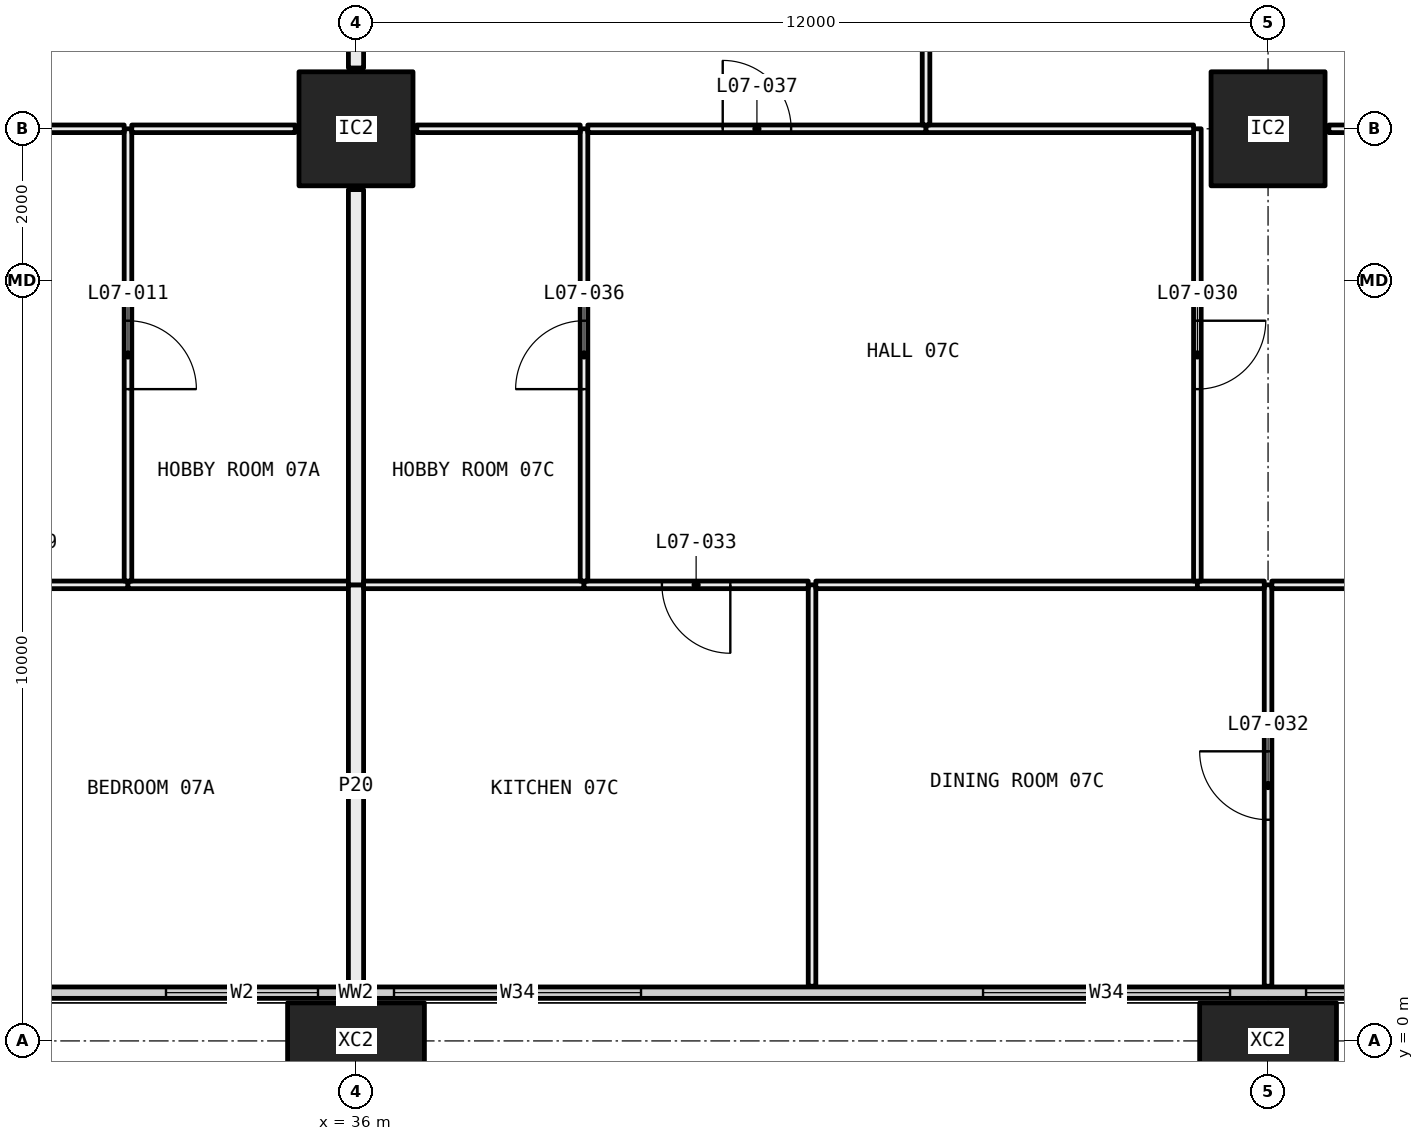
"""IFC4 building model, lengths in metres.
Left out: names, types, materials, properties, quantities, classifications, styles, units other than length and angle.
Written with IfcOpenShell. Run it as: python <this file> out.ifc"""

import sys

from ifc_helpers import new_model, si_unit, direction, frame, frame_2d, origin, origin_2d, place, context, subcontext, project, spatial, rectangle, hollow_rectangle, extrude, element, fill, save


model = new_model("IFC4")
c1 = context("Model", 3, precision=1e-05, world=origin(), true_north=direction((0.0, 1.0)))
c2 = subcontext(c1, "Body", "Model", "MODEL_VIEW")
j1 = project(units=[si_unit("LENGTHUNIT", "METRE"), si_unit("PLANEANGLEUNIT", "RADIAN")], contexts=[c1])
p1 = place(None, origin())
s1 = spatial("IfcSite", under=j1, at=p1, CompositionType="ELEMENT")
p2 = place(p1, origin())
s2 = spatial("IfcBuilding", under=s1, at=p2, CompositionType="ELEMENT")
p3 = place(p2, frame((0.0, 0.0, 36.9)))
s3 = spatial("IfcBuildingStorey", under=s2, at=p3, CompositionType="ELEMENT", Elevation=36.9)
p4 = place(p3, frame((36.0, 0.0, -0.4), z_axis=(0.0, 0.0, 1.0), x_axis=(1.0, 0.0, 0.0)))
e1 = element("IfcColumn", 1, at=p4, inside=s3, PredefinedType="COLUMN", context=c2, shape_type="SweptSolid", body=[
    extrude(hollow_rectangle(XDim=1.8, YDim=1.0, WallThickness=0.07, at=origin_2d()), origin(), (0.0, 0.0, 1.0), 3.45),
])
p5 = place(p3, frame((36.0, 12.0, 0.0), z_axis=(0.0, 0.0, 1.0), x_axis=(1.0, 0.0, 0.0)))
e2 = element("IfcColumn", 2, at=p5, inside=s3, PredefinedType="COLUMN", context=c2, shape_type="SweptSolid", body=[
    extrude(hollow_rectangle(XDim=1.5, YDim=1.5, WallThickness=0.065, at=origin_2d()), origin(), (0.0, 0.0, 1.0), 3.05),
])
p6 = place(p3, frame((48.0, 0.0, -0.4), z_axis=(0.0, 0.0, 1.0), x_axis=(1.0, 0.0, 0.0)))
e3 = element("IfcColumn", 3, at=p6, inside=s3, PredefinedType="COLUMN", context=c2, shape_type="SweptSolid", body=[
    extrude(hollow_rectangle(XDim=1.8, YDim=1.0, WallThickness=0.07, at=origin_2d()), origin(), (0.0, 0.0, 1.0), 3.45),
])
p7 = place(p3, frame((48.0, 12.0, 0.0), z_axis=(0.0, 0.0, 1.0), x_axis=(1.0, 0.0, 0.0)))
e4 = element("IfcColumn", 4, at=p7, inside=s3, PredefinedType="COLUMN", context=c2, shape_type="SweptSolid", body=[
    extrude(hollow_rectangle(XDim=1.5, YDim=1.5, WallThickness=0.065, at=origin_2d()), origin(), (0.0, 0.0, 1.0), 3.05),
])
p8 = place(p3, frame((6.56, 0.635, 0.0), z_axis=(0.0, 0.0, 1.0), x_axis=(1.0, 0.0, 0.0)))
e5 = element("IfcWall", 5, at=p8, inside=s3, PredefinedType="ELEMENTEDWALL", context=c2, shape_type="SweptSolid", body=[
    extrude(rectangle(XDim=58.88, YDim=0.15, at=frame_2d((29.44, 0.0))), origin(), (0.0, 0.0, 1.0), 3.05),
])
p9 = place(p8, frame((0.44, 0.0, 0.45)))
e6 = element("IfcOpeningElement", 6, at=p9, cuts=e5, PredefinedType="OPENING", context=c2, shape_type="SweptSolid", body=[
    extrude(rectangle(XDim=4.5, YDim=2.55, at=frame_2d((2.25, 1.275))), frame((0.0, 0.085, 0.0), z_axis=(0.0, -1.0, 0.0), x_axis=(1.0, 0.0, 0.0)), (0.0, 0.0, 1.0), 0.17),
])
p10 = place(p8, frame((5.94, 0.0, 0.45)))
e7 = element("IfcOpeningElement", 7, at=p10, cuts=e5, PredefinedType="OPENING", context=c2, shape_type="SweptSolid", body=[
    extrude(rectangle(XDim=3.25, YDim=2.55, at=frame_2d((1.625, 1.275))), frame((0.0, 0.085, 0.0), z_axis=(0.0, -1.0, 0.0), x_axis=(1.0, 0.0, 0.0)), (0.0, 0.0, 1.0), 0.17),
])
p11 = place(p8, frame((13.69, 0.0, 0.45)))
e8 = element("IfcOpeningElement", 8, at=p11, cuts=e5, PredefinedType="OPENING", context=c2, shape_type="SweptSolid", body=[
    extrude(rectangle(XDim=3.25, YDim=2.55, at=frame_2d((1.625, 1.275))), frame((0.0, 0.085, 0.0), z_axis=(0.0, -1.0, 0.0), x_axis=(1.0, 0.0, 0.0)), (0.0, 0.0, 1.0), 0.17),
])
p12 = place(p8, frame((17.94, 0.0, 0.45)))
e9 = element("IfcOpeningElement", 9, at=p12, cuts=e5, PredefinedType="OPENING", context=c2, shape_type="SweptSolid", body=[
    extrude(rectangle(XDim=3.25, YDim=2.55, at=frame_2d((1.625, 1.275))), frame((0.0, 0.085, 0.0), z_axis=(0.0, -1.0, 0.0), x_axis=(1.0, 0.0, 0.0)), (0.0, 0.0, 1.0), 0.17),
])
p13 = place(p8, frame((26.94, 0.0, 0.45)))
e10 = element("IfcOpeningElement", 10, at=p13, cuts=e5, PredefinedType="OPENING", context=c2, shape_type="SweptSolid", body=[
    extrude(rectangle(XDim=2.0, YDim=2.55, at=frame_2d((1.0, 1.275))), frame((0.0, 0.085, 0.0), z_axis=(0.0, -1.0, 0.0), x_axis=(1.0, 0.0, 0.0)), (0.0, 0.0, 1.0), 0.17),
])
p14 = place(p8, frame((29.94, 0.0, 0.45)))
e11 = element("IfcOpeningElement", 11, at=p14, cuts=e5, PredefinedType="OPENING", context=c2, shape_type="SweptSolid", body=[
    extrude(rectangle(XDim=3.25, YDim=2.55, at=frame_2d((1.625, 1.275))), frame((0.0, 0.085, 0.0), z_axis=(0.0, -1.0, 0.0), x_axis=(1.0, 0.0, 0.0)), (0.0, 0.0, 1.0), 0.17),
])
p15 = place(p8, frame((37.69, 0.0, 0.45)))
e12 = element("IfcOpeningElement", 12, at=p15, cuts=e5, PredefinedType="OPENING", context=c2, shape_type="SweptSolid", body=[
    extrude(rectangle(XDim=3.25, YDim=2.55, at=frame_2d((1.625, 1.275))), frame((0.0, 0.085, 0.0), z_axis=(0.0, -1.0, 0.0), x_axis=(1.0, 0.0, 0.0)), (0.0, 0.0, 1.0), 0.17),
])
p16 = place(p8, frame((41.94, 0.0, 0.45)))
e13 = element("IfcOpeningElement", 13, at=p16, cuts=e5, PredefinedType="OPENING", context=c2, shape_type="SweptSolid", body=[
    extrude(rectangle(XDim=3.25, YDim=2.55, at=frame_2d((1.625, 1.275))), frame((0.0, 0.085, 0.0), z_axis=(0.0, -1.0, 0.0), x_axis=(1.0, 0.0, 0.0)), (0.0, 0.0, 1.0), 0.17),
])
p17 = place(p8, frame((50.94, 0.0, 0.45)))
e14 = element("IfcOpeningElement", 14, at=p17, cuts=e5, PredefinedType="OPENING", context=c2, shape_type="SweptSolid", body=[
    extrude(rectangle(XDim=2.0, YDim=2.55, at=frame_2d((1.0, 1.275))), frame((0.0, 0.085, 0.0), z_axis=(0.0, -1.0, 0.0), x_axis=(1.0, 0.0, 0.0)), (0.0, 0.0, 1.0), 0.17),
])
p18 = place(p8, frame((53.94, 0.0, 0.45)))
e15 = element("IfcOpeningElement", 15, at=p18, cuts=e5, PredefinedType="OPENING", context=c2, shape_type="SweptSolid", body=[
    extrude(rectangle(XDim=4.5, YDim=2.55, at=frame_2d((2.25, 1.275))), frame((0.0, 0.085, 0.0), z_axis=(0.0, -1.0, 0.0), x_axis=(1.0, 0.0, 0.0)), (0.0, 0.0, 1.0), 0.17),
])
p19 = place(p3, frame((33.0, 6.0, 0.0), z_axis=(0.0, 0.0, 1.0), x_axis=(-1.0, 0.0, 0.0)))
e16 = element("IfcWall", 16, at=p19, inside=s3, PredefinedType="PARTITIONING", context=c2, shape_type="SweptSolid", body=[
    extrude(rectangle(XDim=2.95, YDim=0.1, at=frame_2d((1.475, 0.0))), origin(), (0.0, 0.0, 1.0), 3.05),
])
p20 = place(p19, frame((1.025, 0.0, 0.0)))
e17 = element("IfcOpeningElement", 17, at=p20, cuts=e16, PredefinedType="OPENING", context=c2, shape_type="SweptSolid", body=[
    extrude(rectangle(XDim=0.9, YDim=2.1, at=frame_2d((0.45, 1.05))), frame((0.0, 0.06, 0.0), z_axis=(0.0, -1.0, 0.0), x_axis=(1.0, 0.0, 0.0)), (0.0, 0.0, 1.0), 0.12),
])
p21 = place(p3, frame((35.9, 6.0, 0.0), z_axis=(0.0, 0.0, 1.0), x_axis=(-1.0, 0.0, 0.0)))
e18 = element("IfcWall", 18, at=p21, inside=s3, PredefinedType="PARTITIONING", context=c2, shape_type="SweptSolid", body=[
    extrude(rectangle(XDim=2.9, YDim=0.1, at=frame_2d((1.45, 0.0))), origin(), (0.0, 0.0, 1.0), 3.05),
])
p22 = place(p3, frame((36.0, 0.72, 0.0), z_axis=(0.0, 0.0, 1.0), x_axis=(0.0, 1.0, 0.0)))
e19 = element("IfcWall", 19, at=p22, inside=s3, PredefinedType="PARTITIONING", context=c2, shape_type="SweptSolid", body=[
    extrude(rectangle(XDim=5.28, YDim=0.2, at=frame_2d((2.64, 0.0))), origin(), (0.0, 0.0, 1.0), 2.45),
])
p23 = place(p3, frame((33.0, 6.05, 0.0), z_axis=(0.0, 0.0, 1.0), x_axis=(0.0, 1.0, 0.0)))
e20 = element("IfcWall", 20, at=p23, inside=s3, PredefinedType="PARTITIONING", context=c2, shape_type="SweptSolid", body=[
    extrude(rectangle(XDim=5.95, YDim=0.1, at=frame_2d((2.975, 0.0))), origin(), (0.0, 0.0, 1.0), 2.45),
])
p24 = place(p23, frame((2.525, 0.0, 0.0)))
e21 = element("IfcOpeningElement", 21, at=p24, cuts=e20, PredefinedType="OPENING", context=c2, shape_type="SweptSolid", body=[
    extrude(rectangle(XDim=0.9, YDim=2.1, at=frame_2d((0.45, 1.05))), frame((0.0, 0.06, 0.0), z_axis=(0.0, -1.0, 0.0), x_axis=(1.0, 0.0, 0.0)), (0.0, 0.0, 1.0), 0.12),
])
p25 = place(p3, frame((32.95, 12.0, 0.0), z_axis=(0.0, 0.0, 1.0), x_axis=(-1.0, 0.0, 0.0)))
e22 = element("IfcWall", 22, at=p25, inside=s3, PredefinedType="PARTITIONING", context=c2, shape_type="SweptSolid", body=[
    extrude(rectangle(XDim=5.95, YDim=0.1, at=frame_2d((2.975, 0.0))), origin(), (0.0, 0.0, 1.0), 2.45),
])
p26 = place(p25, frame((2.525, 0.0, 0.0)))
e23 = element("IfcOpeningElement", 23, at=p26, cuts=e22, PredefinedType="OPENING", context=c2, shape_type="SweptSolid", body=[
    extrude(rectangle(XDim=0.9, YDim=2.1, at=frame_2d((0.45, 1.05))), frame((0.0, 0.06, 0.0), z_axis=(0.0, -1.0, 0.0), x_axis=(1.0, 0.0, 0.0)), (0.0, 0.0, 1.0), 0.12),
])
p27 = place(p3, frame((35.2, 12.0, 0.0), z_axis=(0.0, 0.0, 1.0), x_axis=(-1.0, 0.0, 0.0)))
e24 = element("IfcWall", 24, at=p27, inside=s3, PredefinedType="PARTITIONING", context=c2, shape_type="SweptSolid", body=[
    extrude(rectangle(XDim=2.15, YDim=0.1, at=frame_2d((1.075, 0.0))), origin(), (0.0, 0.0, 1.0), 2.45),
])
for number, where, z_axis, x_axis in (
    (25, (36.0, 6.0, 0.0), (0.0, 0.0, 1.0), (0.0, 1.0, 0.0)),
    (26, (36.0, 12.8, 0.0), (0.0, 0.0, 1.0), (0.0, 1.0, 0.0)),
):
    element("IfcWall", number, at=place(p3, frame(where, z_axis=z_axis, x_axis=x_axis)), inside=s3, PredefinedType="PARTITIONING", context=c2, shape_type="SweptSolid", body=[
        extrude(rectangle(XDim=5.2, YDim=0.2, at=frame_2d((2.6, 0.0))), origin(), (0.0, 0.0, 1.0), 2.45),
    ])
p28 = place(p3, frame((42.0, 0.72, 0.0), z_axis=(0.0, 0.0, 1.0), x_axis=(0.0, 1.0, 0.0)))
e27 = element("IfcWall", 27, at=p28, inside=s3, PredefinedType="PARTITIONING", context=c2, shape_type="SweptSolid", body=[
    extrude(rectangle(XDim=5.28, YDim=0.1, at=frame_2d((2.64, 0.0))), origin(), (0.0, 0.0, 1.0), 3.05),
])
p29 = place(p3, frame((39.0, 6.0, 0.0), z_axis=(0.0, 0.0, 1.0), x_axis=(-1.0, 0.0, 0.0)))
e28 = element("IfcWall", 28, at=p29, inside=s3, PredefinedType="PARTITIONING", context=c2, shape_type="SweptSolid", body=[
    extrude(rectangle(XDim=2.9, YDim=0.1, at=frame_2d((1.45, 0.0))), origin(), (0.0, 0.0, 1.0), 3.05),
])
p30 = place(p3, frame((41.95, 6.0, 0.0), z_axis=(0.0, 0.0, 1.0), x_axis=(-1.0, 0.0, 0.0)))
e29 = element("IfcWall", 29, at=p30, inside=s3, PredefinedType="PARTITIONING", context=c2, shape_type="SweptSolid", body=[
    extrude(rectangle(XDim=2.95, YDim=0.1, at=frame_2d((1.475, 0.0))), origin(), (0.0, 0.0, 1.0), 3.05),
])
p31 = place(p30, frame((1.025, 0.0, 0.0)))
e30 = element("IfcOpeningElement", 30, at=p31, cuts=e29, PredefinedType="OPENING", context=c2, shape_type="SweptSolid", body=[
    extrude(rectangle(XDim=0.9, YDim=2.1, at=frame_2d((0.45, 1.05))), frame((0.0, 0.06, 0.0), z_axis=(0.0, -1.0, 0.0), x_axis=(1.0, 0.0, 0.0)), (0.0, 0.0, 1.0), 0.12),
])
p32 = place(p3, frame((48.0, 0.72, 0.0), z_axis=(0.0, 0.0, 1.0), x_axis=(0.0, 1.0, 0.0)))
e31 = element("IfcWall", 31, at=p32, inside=s3, PredefinedType="PARTITIONING", context=c2, shape_type="SweptSolid", body=[
    extrude(rectangle(XDim=5.28, YDim=0.1, at=frame_2d((2.64, 0.0))), origin(), (0.0, 0.0, 1.0), 2.45),
])
p33 = place(p32, frame((2.19, 0.0, 0.0)))
e32 = element("IfcOpeningElement", 32, at=p33, cuts=e31, PredefinedType="OPENING", context=c2, shape_type="SweptSolid", body=[
    extrude(rectangle(XDim=0.9, YDim=2.1, at=frame_2d((0.45, 1.05))), frame((0.0, 0.06, 0.0), z_axis=(0.0, -1.0, 0.0), x_axis=(1.0, 0.0, 0.0)), (0.0, 0.0, 1.0), 0.12),
])
p34 = place(p3, frame((47.07, 6.0, 0.0), z_axis=(0.0, 0.0, 1.0), x_axis=(-1.0, 0.0, 0.0)))
e33 = element("IfcWall", 33, at=p34, inside=s3, PredefinedType="PARTITIONING", context=c2, shape_type="SweptSolid", body=[
    extrude(rectangle(XDim=5.02, YDim=0.1, at=frame_2d((2.51, 0.0))), origin(), (0.0, 0.0, 1.0), 3.05),
])
p35 = place(p3, frame((47.95, 6.0, 0.0), z_axis=(0.0, 0.0, 1.0), x_axis=(-1.0, 0.0, 0.0)))
e34 = element("IfcWall", 34, at=p35, inside=s3, PredefinedType="PARTITIONING", context=c2, shape_type="SweptSolid", body=[
    extrude(rectangle(XDim=0.88, YDim=0.1, at=frame_2d((0.44, 0.0))), origin(), (0.0, 0.0, 1.0), 2.45),
])
p36 = place(p3, frame((55.14, 6.0, 0.0), z_axis=(0.0, 0.0, 1.0), x_axis=(-1.0, 0.0, 0.0)))
e35 = element("IfcWall", 35, at=p36, inside=s3, PredefinedType="PARTITIONING", context=c2, shape_type="SweptSolid", body=[
    extrude(rectangle(XDim=7.09, YDim=0.1, at=frame_2d((3.545, 0.0))), origin(), (0.0, 0.0, 1.0), 2.45),
])
p37 = place(p36, frame((3.095, 0.0, 0.0)))
e36 = element("IfcOpeningElement", 36, at=p37, cuts=e35, PredefinedType="OPENING", context=c2, shape_type="SweptSolid", body=[
    extrude(rectangle(XDim=0.9, YDim=2.1, at=frame_2d((0.45, 1.05))), frame((0.0, 0.06, 0.0), z_axis=(0.0, -1.0, 0.0), x_axis=(1.0, 0.0, 0.0)), (0.0, 0.0, 1.0), 0.12),
])
p38 = place(p3, frame((39.0, 6.05, 0.0), z_axis=(0.0, 0.0, 1.0), x_axis=(0.0, 1.0, 0.0)))
e37 = element("IfcWall", 37, at=p38, inside=s3, PredefinedType="PARTITIONING", context=c2, shape_type="SweptSolid", body=[
    extrude(rectangle(XDim=5.95, YDim=0.1, at=frame_2d((2.975, 0.0))), origin(), (0.0, 0.0, 1.0), 2.45),
])
p39 = place(p38, frame((2.525, 0.0, 0.0)))
e38 = element("IfcOpeningElement", 38, at=p39, cuts=e37, PredefinedType="OPENING", context=c2, shape_type="SweptSolid", body=[
    extrude(rectangle(XDim=0.9, YDim=2.1, at=frame_2d((0.45, 1.05))), frame((0.0, 0.06, 0.0), z_axis=(0.0, -1.0, 0.0), x_axis=(1.0, 0.0, 0.0)), (0.0, 0.0, 1.0), 0.12),
])
p40 = place(p3, frame((38.95, 12.0, 0.0), z_axis=(0.0, 0.0, 1.0), x_axis=(-1.0, 0.0, 0.0)))
e39 = element("IfcWall", 39, at=p40, inside=s3, PredefinedType="PARTITIONING", context=c2, shape_type="SweptSolid", body=[
    extrude(rectangle(XDim=2.15, YDim=0.1, at=frame_2d((1.075, 0.0))), origin(), (0.0, 0.0, 1.0), 2.45),
])
p41 = place(p3, frame((47.07, 6.05, 0.0), z_axis=(0.0, 0.0, 1.0), x_axis=(0.0, 1.0, 0.0)))
e40 = element("IfcWall", 40, at=p41, inside=s3, PredefinedType="PARTITIONING", context=c2, shape_type="SweptSolid", body=[
    extrude(rectangle(XDim=5.95, YDim=0.1, at=frame_2d((2.975, 0.0))), origin(), (0.0, 0.0, 1.0), 2.45),
])
p42 = place(p41, frame((2.525, 0.0, 0.0)))
e41 = element("IfcOpeningElement", 41, at=p42, cuts=e40, PredefinedType="OPENING", context=c2, shape_type="SweptSolid", body=[
    extrude(rectangle(XDim=0.9, YDim=2.1, at=frame_2d((0.45, 1.05))), frame((0.0, 0.06, 0.0), z_axis=(0.0, -1.0, 0.0), x_axis=(1.0, 0.0, 0.0)), (0.0, 0.0, 1.0), 0.12),
])
p43 = place(p3, frame((43.5, 12.0, 0.0), z_axis=(0.0, 0.0, 1.0), x_axis=(-1.0, 0.0, 0.0)))
e42 = element("IfcWall", 42, at=p43, inside=s3, PredefinedType="PARTITIONING", context=c2, shape_type="SweptSolid", body=[
    extrude(rectangle(XDim=4.45, YDim=0.1, at=frame_2d((2.225, 0.0))), origin(), (0.0, 0.0, 1.0), 2.45),
])
p44 = place(p43, frame((1.775, 0.0, 0.0)))
e43 = element("IfcOpeningElement", 43, at=p44, cuts=e42, PredefinedType="OPENING", context=c2, shape_type="SweptSolid", body=[
    extrude(rectangle(XDim=0.9, YDim=2.1, at=frame_2d((0.45, 1.05))), frame((0.0, 0.06, 0.0), z_axis=(0.0, -1.0, 0.0), x_axis=(1.0, 0.0, 0.0)), (0.0, 0.0, 1.0), 0.12),
])
p45 = place(p3, frame((47.02, 12.0, 0.0), z_axis=(0.0, 0.0, 1.0), x_axis=(-1.0, 0.0, 0.0)))
e44 = element("IfcWall", 44, at=p45, inside=s3, PredefinedType="PARTITIONING", context=c2, shape_type="SweptSolid", body=[
    extrude(rectangle(XDim=3.52, YDim=0.1, at=frame_2d((1.76, 0.0))), origin(), (0.0, 0.0, 1.0), 2.45),
])
p46 = place(p3, frame((51.0, 12.0, 0.0), z_axis=(0.0, 0.0, 1.0), x_axis=(-1.0, 0.0, 0.0)))
e45 = element("IfcWall", 45, at=p46, inside=s3, PredefinedType="PARTITIONING", context=c2, shape_type="SweptSolid", body=[
    extrude(rectangle(XDim=2.2, YDim=0.1, at=frame_2d((1.1, 0.0))), origin(), (0.0, 0.0, 1.0), 2.45),
])
p47 = place(p3, frame((43.5, 12.05, 0.0), z_axis=(0.0, 0.0, 1.0), x_axis=(0.0, 1.0, 0.0)))
e46 = element("IfcWall", 46, at=p47, inside=s3, PredefinedType="PARTITIONING", context=c2, shape_type="SweptSolid", body=[
    extrude(rectangle(XDim=5.95, YDim=0.1, at=frame_2d((2.975, 0.0))), origin(), (0.0, 0.0, 1.0), 2.45),
])
p48 = place(p13, origin())
e47 = element("IfcWindow", 47, at=p48, inside=s3, PartitioningType="SINGLE_PANEL", PredefinedType="WINDOW", context=c2, shape_type="SweptSolid", body=[
    extrude(rectangle(XDim=2.0, YDim=2.55, at=frame_2d((1.0, 1.275))), frame((0.0, 0.03, 0.0), z_axis=(0.0, -1.0, 0.0), x_axis=(1.0, 0.0, 0.0)), (0.0, 0.0, 1.0), 0.06),
])
fill(e10, e47)
p49 = place(p14, origin())
e48 = element("IfcWindow", 48, at=p49, inside=s3, PartitioningType="SINGLE_PANEL", PredefinedType="WINDOW", context=c2, shape_type="SweptSolid", body=[
    extrude(rectangle(XDim=3.25, YDim=2.55, at=frame_2d((1.625, 1.275))), frame((0.0, 0.03, 0.0), z_axis=(0.0, -1.0, 0.0), x_axis=(1.0, 0.0, 0.0)), (0.0, 0.0, 1.0), 0.06),
])
fill(e11, e48)
p50 = place(p15, origin())
e49 = element("IfcWindow", 49, at=p50, inside=s3, PartitioningType="SINGLE_PANEL", PredefinedType="WINDOW", context=c2, shape_type="SweptSolid", body=[
    extrude(rectangle(XDim=3.25, YDim=2.55, at=frame_2d((1.625, 1.275))), frame((0.0, 0.03, 0.0), z_axis=(0.0, -1.0, 0.0), x_axis=(1.0, 0.0, 0.0)), (0.0, 0.0, 1.0), 0.06),
])
fill(e12, e49)
p51 = place(p16, origin())
e50 = element("IfcWindow", 50, at=p51, inside=s3, PartitioningType="SINGLE_PANEL", PredefinedType="WINDOW", context=c2, shape_type="SweptSolid", body=[
    extrude(rectangle(XDim=3.25, YDim=2.55, at=frame_2d((1.625, 1.275))), frame((0.0, 0.03, 0.0), z_axis=(0.0, -1.0, 0.0), x_axis=(1.0, 0.0, 0.0)), (0.0, 0.0, 1.0), 0.06),
])
fill(e13, e50)
p52 = place(p24, frame((0.9, 0.0, 0.0), x_axis=(-1.0, 0.0, 0.0)))
e51 = element("IfcDoor", 51, at=p52, inside=s3, OperationType="SINGLE_SWING_LEFT", PredefinedType="DOOR", context=c2, shape_type="SweptSolid", body=[
    extrude(rectangle(XDim=0.9, YDim=2.1, at=frame_2d((0.45, 1.05))), frame((0.0, 0.025, 0.0), z_axis=(0.0, -1.0, 0.0), x_axis=(1.0, 0.0, 0.0)), (0.0, 0.0, 1.0), 0.05),
])
fill(e21, e51)
p53 = place(p42, frame((0.9, 0.0, 0.0), x_axis=(-1.0, 0.0, 0.0)))
e52 = element("IfcDoor", 52, at=p53, inside=s3, OperationType="SINGLE_SWING_RIGHT", PredefinedType="DOOR", context=c2, shape_type="SweptSolid", body=[
    extrude(rectangle(XDim=0.9, YDim=2.1, at=frame_2d((0.45, 1.05))), frame((0.0, 0.025, 0.0), z_axis=(0.0, -1.0, 0.0), x_axis=(1.0, 0.0, 0.0)), (0.0, 0.0, 1.0), 0.05),
])
fill(e41, e52)
p54 = place(p33, origin())
e53 = element("IfcDoor", 53, at=p54, inside=s3, OperationType="SINGLE_SWING_LEFT", PredefinedType="DOOR", context=c2, shape_type="SweptSolid", body=[
    extrude(rectangle(XDim=0.9, YDim=2.1, at=frame_2d((0.45, 1.05))), frame((0.0, 0.025, 0.0), z_axis=(0.0, -1.0, 0.0), x_axis=(1.0, 0.0, 0.0)), (0.0, 0.0, 1.0), 0.05),
])
fill(e32, e53)
p55 = place(p31, origin())
e54 = element("IfcDoor", 54, at=p55, inside=s3, OperationType="SINGLE_SWING_RIGHT", PredefinedType="DOOR", context=c2, shape_type="SweptSolid", body=[
    extrude(rectangle(XDim=0.9, YDim=2.1, at=frame_2d((0.45, 1.05))), frame((0.0, 0.025, 0.0), z_axis=(0.0, -1.0, 0.0), x_axis=(1.0, 0.0, 0.0)), (0.0, 0.0, 1.0), 0.05),
])
fill(e30, e54)
p56 = place(p39, origin())
e55 = element("IfcDoor", 55, at=p56, inside=s3, OperationType="SINGLE_SWING_RIGHT", PredefinedType="DOOR", context=c2, shape_type="SweptSolid", body=[
    extrude(rectangle(XDim=0.9, YDim=2.1, at=frame_2d((0.45, 1.05))), frame((0.0, 0.025, 0.0), z_axis=(0.0, -1.0, 0.0), x_axis=(1.0, 0.0, 0.0)), (0.0, 0.0, 1.0), 0.05),
])
fill(e38, e55)
p57 = place(p44, frame((0.9, 0.0, 0.0), x_axis=(-1.0, 0.0, 0.0)))
e56 = element("IfcDoor", 56, at=p57, inside=s3, OperationType="SINGLE_SWING_RIGHT", PredefinedType="DOOR", context=c2, shape_type="SweptSolid", body=[
    extrude(rectangle(XDim=0.9, YDim=2.1, at=frame_2d((0.45, 1.05))), frame((0.0, 0.025, 0.0), z_axis=(0.0, -1.0, 0.0), x_axis=(1.0, 0.0, 0.0)), (0.0, 0.0, 1.0), 0.05),
])
fill(e43, e56)
save(model, sys.argv[1])
